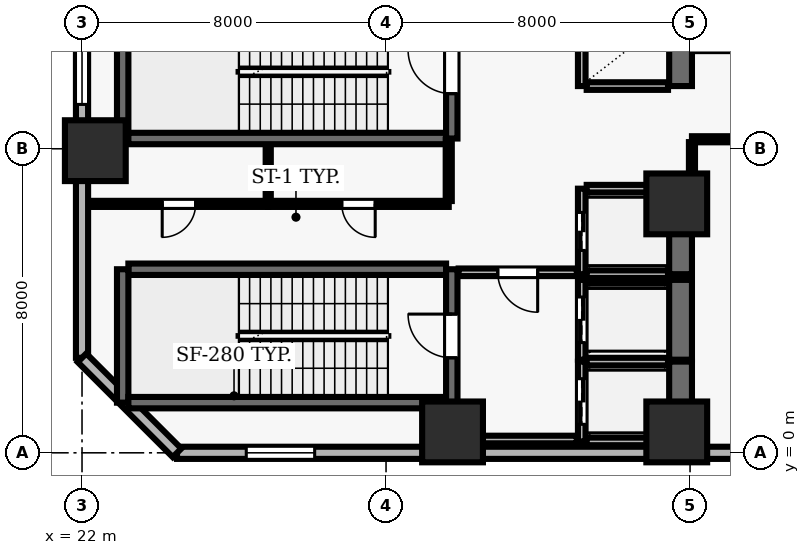
"""IFC4 building model, lengths in metres.
Left out: names, types, materials, properties, quantities, classifications, styles, units other than length and angle.
Written with IfcOpenShell. Run it as: python <this file> out.ifc"""

import sys

from ifc_helpers import new_model, si_unit, direction, frame, frame_2d, origin, origin_2d, place, context, subcontext, project, spatial, rectangle, extrude, element, fill, save


model = new_model("IFC4")
c1 = context("Model", 3, precision=1e-05, world=origin(), true_north=direction((0.0, 1.0)))
c2 = subcontext(c1, "Body", "Model", "MODEL_VIEW")
j1 = project(units=[si_unit("LENGTHUNIT", "METRE"), si_unit("PLANEANGLEUNIT", "RADIAN")], contexts=[c1])
p1 = place(None, origin())
s1 = spatial("IfcSite", under=j1, at=p1, CompositionType="ELEMENT")
p2 = place(p1, origin())
s2 = spatial("IfcBuilding", under=s1, at=p2, CompositionType="ELEMENT")
p3 = place(p2, frame((0.0, 0.0, 10.4)))
s3 = spatial("IfcBuildingStorey", under=s2, at=p3, CompositionType="ELEMENT", Elevation=10.4)
for number, where, z_axis, x_axis in (
    (1, (31.75, 0.55, 0.0), (0.0, 0.0, 1.0), (1.0, 0.0, 0.0)),
    (2, (37.65, 0.55, 0.0), (0.0, 0.0, 1.0), (1.0, 0.0, 0.0)),
    (3, (22.35, 7.95, 0.0), (0.0, 0.0, 1.0), (1.0, 0.0, 0.0)),
    (4, (37.65, 6.55, 0.0), (0.0, 0.0, 1.0), (1.0, 0.0, 0.0)),
):
    element("IfcColumn", number, at=place(p3, frame(where, z_axis=z_axis, x_axis=x_axis)), inside=s3, PredefinedType="COLUMN", context=c2, shape_type="SweptSolid", body=[
        extrude(rectangle(XDim=1.6, YDim=1.6, at=origin_2d()), origin(), (0.0, 0.0, 1.0), 5.2),
    ])
p4 = place(p3, frame((24.5, 0.0, 0.0), z_axis=(0.0, 0.0, 1.0), x_axis=(1.0, 0.0, 0.0)))
e5 = element("IfcWall", 5, at=p4, inside=s3, PredefinedType="SOLIDWALL", context=c2, shape_type="SweptSolid", body=[
    extrude(rectangle(XDim=49.0, YDim=0.32, at=frame_2d((24.5, 0.0))), origin(), (0.0, 0.0, 1.0), 4.92),
])
p5 = place(p4, frame((1.822, 0.0, 0.9)))
e6 = element("IfcOpeningElement", 6, at=p5, cuts=e5, PredefinedType="OPENING", context=c2, shape_type="SweptSolid", body=[
    extrude(rectangle(XDim=1.8, YDim=1.6, at=frame_2d((0.9, 0.8))), frame((0.0, 0.17, 0.0), z_axis=(0.0, -1.0, 0.0), x_axis=(1.0, 0.0, 0.0)), (0.0, 0.0, 1.0), 0.34),
])
p6 = place(p4, frame((18.156, 0.0, 0.9)))
e7 = element("IfcOpeningElement", 7, at=p6, cuts=e5, PredefinedType="OPENING", context=c2, shape_type="SweptSolid", body=[
    extrude(rectangle(XDim=1.8, YDim=1.6, at=frame_2d((0.9, 0.8))), frame((0.0, 0.17, 0.0), z_axis=(0.0, -1.0, 0.0), x_axis=(1.0, 0.0, 0.0)), (0.0, 0.0, 1.0), 0.34),
])
p7 = place(p4, frame((23.6, 0.0, 0.9)))
e8 = element("IfcOpeningElement", 8, at=p7, cuts=e5, PredefinedType="OPENING", context=c2, shape_type="SweptSolid", body=[
    extrude(rectangle(XDim=1.8, YDim=1.6, at=frame_2d((0.9, 0.8))), frame((0.0, 0.17, 0.0), z_axis=(0.0, -1.0, 0.0), x_axis=(1.0, 0.0, 0.0)), (0.0, 0.0, 1.0), 0.34),
])
p8 = place(p4, frame((29.044, 0.0, 0.9)))
e9 = element("IfcOpeningElement", 9, at=p8, cuts=e5, PredefinedType="OPENING", context=c2, shape_type="SweptSolid", body=[
    extrude(rectangle(XDim=1.8, YDim=1.6, at=frame_2d((0.9, 0.8))), frame((0.0, 0.17, 0.0), z_axis=(0.0, -1.0, 0.0), x_axis=(1.0, 0.0, 0.0)), (0.0, 0.0, 1.0), 0.34),
])
p9 = place(p4, frame((34.489, 0.0, 0.9)))
e10 = element("IfcOpeningElement", 10, at=p9, cuts=e5, PredefinedType="OPENING", context=c2, shape_type="SweptSolid", body=[
    extrude(rectangle(XDim=1.8, YDim=1.6, at=frame_2d((0.9, 0.8))), frame((0.0, 0.17, 0.0), z_axis=(0.0, -1.0, 0.0), x_axis=(1.0, 0.0, 0.0)), (0.0, 0.0, 1.0), 0.34),
])
p10 = place(p4, frame((39.933, 0.0, 0.9)))
e11 = element("IfcOpeningElement", 11, at=p10, cuts=e5, PredefinedType="OPENING", context=c2, shape_type="SweptSolid", body=[
    extrude(rectangle(XDim=1.8, YDim=1.6, at=frame_2d((0.9, 0.8))), frame((0.0, 0.17, 0.0), z_axis=(0.0, -1.0, 0.0), x_axis=(1.0, 0.0, 0.0)), (0.0, 0.0, 1.0), 0.34),
])
p11 = place(p4, frame((45.378, 0.0, 0.9)))
e12 = element("IfcOpeningElement", 12, at=p11, cuts=e5, PredefinedType="OPENING", context=c2, shape_type="SweptSolid", body=[
    extrude(rectangle(XDim=1.8, YDim=1.6, at=frame_2d((0.9, 0.8))), frame((0.0, 0.17, 0.0), z_axis=(0.0, -1.0, 0.0), x_axis=(1.0, 0.0, 0.0)), (0.0, 0.0, 1.0), 0.34),
])
p12 = place(p3, frame((22.0, 51.5, 0.0), z_axis=(0.0, 0.0, 1.0), x_axis=(0.0, -1.0, 0.0)))
e13 = element("IfcWall", 13, at=p12, inside=s3, PredefinedType="SOLIDWALL", context=c2, shape_type="SweptSolid", body=[
    extrude(rectangle(XDim=49.0, YDim=0.32, at=frame_2d((24.5, 0.0))), origin(), (0.0, 0.0, 1.0), 4.92),
])
p13 = place(p12, frame((0.772, 0.0, 0.9)))
e14 = element("IfcOpeningElement", 14, at=p13, cuts=e13, PredefinedType="OPENING", context=c2, shape_type="SweptSolid", body=[
    extrude(rectangle(XDim=3.0, YDim=2.2, at=frame_2d((1.5, 1.1))), frame((0.0, 0.17, 0.0), z_axis=(0.0, -1.0, 0.0), x_axis=(1.0, 0.0, 0.0)), (0.0, 0.0, 1.0), 0.34),
])
p14 = place(p12, frame((6.667, 0.0, 0.9)))
e15 = element("IfcOpeningElement", 15, at=p14, cuts=e13, PredefinedType="OPENING", context=c2, shape_type="SweptSolid", body=[
    extrude(rectangle(XDim=3.0, YDim=2.2, at=frame_2d((1.5, 1.1))), frame((0.0, 0.17, 0.0), z_axis=(0.0, -1.0, 0.0), x_axis=(1.0, 0.0, 0.0)), (0.0, 0.0, 1.0), 0.34),
])
p15 = place(p12, frame((11.661, 0.0, 0.9)))
e16 = element("IfcOpeningElement", 16, at=p15, cuts=e13, PredefinedType="OPENING", context=c2, shape_type="SweptSolid", body=[
    extrude(rectangle(XDim=3.0, YDim=2.2, at=frame_2d((1.5, 1.1))), frame((0.0, 0.17, 0.0), z_axis=(0.0, -1.0, 0.0), x_axis=(1.0, 0.0, 0.0)), (0.0, 0.0, 1.0), 0.34),
])
p16 = place(p12, frame((17.556, 0.0, 0.9)))
e17 = element("IfcOpeningElement", 17, at=p16, cuts=e13, PredefinedType="OPENING", context=c2, shape_type="SweptSolid", body=[
    extrude(rectangle(XDim=3.0, YDim=2.2, at=frame_2d((1.5, 1.1))), frame((0.0, 0.17, 0.0), z_axis=(0.0, -1.0, 0.0), x_axis=(1.0, 0.0, 0.0)), (0.0, 0.0, 1.0), 0.34),
])
p17 = place(p12, frame((39.333, 0.0, 0.9)))
e18 = element("IfcOpeningElement", 18, at=p17, cuts=e13, PredefinedType="OPENING", context=c2, shape_type="SweptSolid", body=[
    extrude(rectangle(XDim=3.0, YDim=2.2, at=frame_2d((1.5, 1.1))), frame((0.0, 0.17, 0.0), z_axis=(0.0, -1.0, 0.0), x_axis=(1.0, 0.0, 0.0)), (0.0, 0.0, 1.0), 0.34),
])
p18 = place(p3, frame((22.0, 2.5, 0.0), z_axis=(0.0, 0.0, 1.0), x_axis=(0.707106781187, -0.707106781187, 0.0)))
e19 = element("IfcWall", 19, at=p18, inside=s3, PredefinedType="SOLIDWALL", context=c2, shape_type="SweptSolid", body=[
    extrude(rectangle(XDim=3.536, YDim=0.32, at=frame_2d((1.768, 0.0))), origin(), (0.0, 0.0, 1.0), 4.92),
])
p19 = place(p3, frame((31.58, 4.83, 0.0), z_axis=(0.0, 0.0, 1.0), x_axis=(-1.0, 0.0, 0.0)))
e20 = element("IfcWall", 20, at=p19, inside=s3, PredefinedType="SHEAR", context=c2, shape_type="SweptSolid", body=[
    extrude(rectangle(XDim=8.36, YDim=0.3, at=frame_2d((4.18, 0.0))), origin(), (0.0, 0.0, 1.0), 4.92),
])
p20 = place(p3, frame((23.07, 4.83, 0.0), z_axis=(0.0, 0.0, 1.0), x_axis=(0.0, -1.0, 0.0)))
e21 = element("IfcWall", 21, at=p20, inside=s3, PredefinedType="SHEAR", context=c2, shape_type="SweptSolid", body=[
    extrude(rectangle(XDim=3.51, YDim=0.3, at=frame_2d((1.755, 0.0))), origin(), (0.0, 0.0, 1.0), 4.92),
])
p21 = place(p3, frame((23.22, 1.32, 0.0), z_axis=(0.0, 0.0, 1.0), x_axis=(1.0, 0.0, 0.0)))
e22 = element("IfcWall", 22, at=p21, inside=s3, PredefinedType="SHEAR", context=c2, shape_type="SweptSolid", body=[
    extrude(rectangle(XDim=8.36, YDim=0.3, at=frame_2d((4.18, 0.0))), origin(), (0.0, 0.0, 1.0), 4.92),
])
p22 = place(p3, frame((31.73, 0.96, 0.0), z_axis=(0.0, 0.0, 1.0), x_axis=(0.0, 1.0, 0.0)))
e23 = element("IfcWall", 23, at=p22, inside=s3, PredefinedType="SHEAR", context=c2, shape_type="SweptSolid", body=[
    extrude(rectangle(XDim=3.87, YDim=0.3, at=frame_2d((1.935, 0.0))), origin(), (0.0, 0.0, 1.0), 4.92),
])
p23 = place(p22, frame((1.54, 0.0, 0.0)))
e24 = element("IfcOpeningElement", 24, at=p23, cuts=e23, PredefinedType="OPENING", context=c2, shape_type="SweptSolid", body=[
    extrude(rectangle(XDim=1.15, YDim=2.15, at=frame_2d((0.575, 1.075))), frame((0.0, 0.16, 0.0), z_axis=(0.0, -1.0, 0.0), x_axis=(1.0, 0.0, 0.0)), (0.0, 0.0, 1.0), 0.32),
])
p24 = place(p3, frame((23.07, 11.78, 0.0), z_axis=(0.0, 0.0, 1.0), x_axis=(0.0, -1.0, 0.0)))
e25 = element("IfcWall", 25, at=p24, inside=s3, PredefinedType="SHEAR", context=c2, shape_type="SweptSolid", body=[
    extrude(rectangle(XDim=3.51, YDim=0.3, at=frame_2d((1.755, 0.0))), origin(), (0.0, 0.0, 1.0), 4.92),
])
p25 = place(p3, frame((23.22, 8.27, 0.0), z_axis=(0.0, 0.0, 1.0), x_axis=(1.0, 0.0, 0.0)))
e26 = element("IfcWall", 26, at=p25, inside=s3, PredefinedType="SHEAR", context=c2, shape_type="SweptSolid", body=[
    extrude(rectangle(XDim=8.36, YDim=0.3, at=frame_2d((4.18, 0.0))), origin(), (0.0, 0.0, 1.0), 4.92),
])
p26 = place(p3, frame((31.73, 8.27, 0.0), z_axis=(0.0, 0.0, 1.0), x_axis=(0.0, 1.0, 0.0)))
e27 = element("IfcWall", 27, at=p26, inside=s3, PredefinedType="SHEAR", context=c2, shape_type="SweptSolid", body=[
    extrude(rectangle(XDim=3.51, YDim=0.3, at=frame_2d((1.755, 0.0))), origin(), (0.0, 0.0, 1.0), 4.92),
])
p27 = place(p26, frame((1.18, 0.0, 0.0)))
e28 = element("IfcOpeningElement", 28, at=p27, cuts=e27, PredefinedType="OPENING", context=c2, shape_type="SweptSolid", body=[
    extrude(rectangle(XDim=1.15, YDim=2.15, at=frame_2d((0.575, 1.075))), frame((0.0, 0.16, 0.0), z_axis=(0.0, -1.0, 0.0), x_axis=(1.0, 0.0, 0.0)), (0.0, 0.0, 1.0), 0.32),
])
p28 = place(p3, frame((35.15, 2.4, 0.0), z_axis=(0.0, 0.0, 1.0), x_axis=(0.0, -1.0, 0.0)))
e29 = element("IfcWall", 29, at=p28, inside=s3, PredefinedType="SOLIDWALL", context=c2, shape_type="SweptSolid", body=[
    extrude(rectangle(XDim=2.1, YDim=0.2, at=frame_2d((1.05, 0.0))), origin(), (0.0, 0.0, 1.0), 4.92),
])
p29 = place(p28, frame((0.45, 0.0, 0.0)))
e30 = element("IfcOpeningElement", 30, at=p29, cuts=e29, PredefinedType="OPENING", context=c2, shape_type="SweptSolid", body=[
    extrude(rectangle(XDim=1.2, YDim=2.15, at=frame_2d((0.6, 1.075))), frame((0.0, 0.11, 0.0), z_axis=(0.0, -1.0, 0.0), x_axis=(1.0, 0.0, 0.0)), (0.0, 0.0, 1.0), 0.22),
])
p30 = place(p3, frame((37.75, 0.3, 0.0), z_axis=(0.0, 0.0, 1.0), x_axis=(0.0, 1.0, 0.0)))
e31 = element("IfcWall", 31, at=p30, inside=s3, PredefinedType="SHEAR", context=c2, shape_type="SweptSolid", body=[
    extrude(rectangle(XDim=2.1, YDim=0.6, at=frame_2d((1.05, 0.0))), origin(), (0.0, 0.0, 1.0), 4.92),
])
for number, where, z_axis, x_axis in (
    (32, (35.28, 0.3, 0.0), (0.0, 0.0, 1.0), (1.0, 0.0, 0.0)),
    (33, (37.42, 2.4, 0.0), (0.0, 0.0, 1.0), (-1.0, 0.0, 0.0)),
):
    element("IfcWall", number, at=place(p3, frame(where, z_axis=z_axis, x_axis=x_axis)), inside=s3, PredefinedType="SOLIDWALL", context=c2, shape_type="SweptSolid", body=[
        extrude(rectangle(XDim=2.14, YDim=0.2, at=frame_2d((1.07, 0.0))), origin(), (0.0, 0.0, 1.0), 4.92),
    ])
p31 = place(p3, frame((35.15, 4.55, 0.0), z_axis=(0.0, 0.0, 1.0), x_axis=(0.0, -1.0, 0.0)))
e34 = element("IfcWall", 34, at=p31, inside=s3, PredefinedType="SOLIDWALL", context=c2, shape_type="SweptSolid", body=[
    extrude(rectangle(XDim=2.1, YDim=0.2, at=frame_2d((1.05, 0.0))), origin(), (0.0, 0.0, 1.0), 4.92),
])
p32 = place(p31, frame((0.45, 0.0, 0.0)))
e35 = element("IfcOpeningElement", 35, at=p32, cuts=e34, PredefinedType="OPENING", context=c2, shape_type="SweptSolid", body=[
    extrude(rectangle(XDim=1.2, YDim=2.15, at=frame_2d((0.6, 1.075))), frame((0.0, 0.11, 0.0), z_axis=(0.0, -1.0, 0.0), x_axis=(1.0, 0.0, 0.0)), (0.0, 0.0, 1.0), 0.22),
])
p33 = place(p3, frame((37.75, 2.45, 0.0), z_axis=(0.0, 0.0, 1.0), x_axis=(0.0, 1.0, 0.0)))
e36 = element("IfcWall", 36, at=p33, inside=s3, PredefinedType="SHEAR", context=c2, shape_type="SweptSolid", body=[
    extrude(rectangle(XDim=2.1, YDim=0.6, at=frame_2d((1.05, 0.0))), origin(), (0.0, 0.0, 1.0), 4.92),
])
p34 = place(p3, frame((37.42, 4.55, 0.0), z_axis=(0.0, 0.0, 1.0), x_axis=(-1.0, 0.0, 0.0)))
e37 = element("IfcWall", 37, at=p34, inside=s3, PredefinedType="SOLIDWALL", context=c2, shape_type="SweptSolid", body=[
    extrude(rectangle(XDim=2.14, YDim=0.2, at=frame_2d((1.07, 0.0))), origin(), (0.0, 0.0, 1.0), 4.92),
])
p35 = place(p3, frame((35.15, 6.95, 0.0), z_axis=(0.0, 0.0, 1.0), x_axis=(0.0, -1.0, 0.0)))
e38 = element("IfcWall", 38, at=p35, inside=s3, PredefinedType="SOLIDWALL", context=c2, shape_type="SweptSolid", body=[
    extrude(rectangle(XDim=2.25, YDim=0.2, at=frame_2d((1.125, 0.0))), origin(), (0.0, 0.0, 1.0), 4.92),
])
p36 = place(p35, frame((0.625, 0.0, 0.0)))
e39 = element("IfcOpeningElement", 39, at=p36, cuts=e38, PredefinedType="OPENING", context=c2, shape_type="SweptSolid", body=[
    extrude(rectangle(XDim=1.0, YDim=2.1, at=frame_2d((0.5, 1.05))), frame((0.0, 0.11, 0.0), z_axis=(0.0, -1.0, 0.0), x_axis=(1.0, 0.0, 0.0)), (0.0, 0.0, 1.0), 0.22),
])
p37 = place(p3, frame((37.75, 4.7, 0.0), z_axis=(0.0, 0.0, 1.0), x_axis=(0.0, 1.0, 0.0)))
e40 = element("IfcWall", 40, at=p37, inside=s3, PredefinedType="SHEAR", context=c2, shape_type="SweptSolid", body=[
    extrude(rectangle(XDim=2.25, YDim=0.6, at=frame_2d((1.125, 0.0))), origin(), (0.0, 0.0, 1.0), 4.92),
])
for number, where, z_axis, x_axis in (
    (41, (35.28, 4.7, 0.0), (0.0, 0.0, 1.0), (1.0, 0.0, 0.0)),
    (42, (37.42, 6.95, 0.0), (0.0, 0.0, 1.0), (-1.0, 0.0, 0.0)),
):
    element("IfcWall", number, at=place(p3, frame(where, z_axis=z_axis, x_axis=x_axis)), inside=s3, PredefinedType="SOLIDWALL", context=c2, shape_type="SweptSolid", body=[
        extrude(rectangle(XDim=2.14, YDim=0.2, at=frame_2d((1.07, 0.0))), origin(), (0.0, 0.0, 1.0), 4.92),
    ])
p38 = place(p3, frame((35.15, 11.55, 0.0), z_axis=(0.0, 0.0, 1.0), x_axis=(0.0, -1.0, 0.0)))
e43 = element("IfcWall", 43, at=p38, inside=s3, PredefinedType="SOLIDWALL", context=c2, shape_type="SweptSolid", body=[
    extrude(rectangle(XDim=1.9, YDim=0.2, at=frame_2d((0.95, 0.0))), origin(), (0.0, 0.0, 1.0), 4.92),
])
p39 = place(p3, frame((37.75, 9.65, 0.0), z_axis=(0.0, 0.0, 1.0), x_axis=(0.0, 1.0, 0.0)))
e44 = element("IfcWall", 44, at=p39, inside=s3, PredefinedType="SHEAR", context=c2, shape_type="SweptSolid", body=[
    extrude(rectangle(XDim=1.9, YDim=0.6, at=frame_2d((0.95, 0.0))), origin(), (0.0, 0.0, 1.0), 4.92),
])
p40 = place(p3, frame((35.28, 9.65, 0.0), z_axis=(0.0, 0.0, 1.0), x_axis=(1.0, 0.0, 0.0)))
e45 = element("IfcWall", 45, at=p40, inside=s3, PredefinedType="SOLIDWALL", context=c2, shape_type="SweptSolid", body=[
    extrude(rectangle(XDim=2.14, YDim=0.2, at=frame_2d((1.07, 0.0))), origin(), (0.0, 0.0, 1.0), 4.92),
])
p41 = place(p3, frame((26.9, 6.55, 0.0), z_axis=(0.0, 0.0, 1.0), x_axis=(-1.0, 0.0, 0.0)))
e46 = element("IfcWall", 46, at=p41, inside=s3, PredefinedType="PARTITIONING", context=c2, shape_type="SweptSolid", body=[
    extrude(rectangle(XDim=4.7, YDim=0.16, at=frame_2d((2.35, 0.0))), origin(), (0.0, 0.0, 1.0), 4.92),
])
p42 = place(p41, frame((1.91, 0.0, 0.0)))
e47 = element("IfcOpeningElement", 47, at=p42, cuts=e46, PredefinedType="OPENING", context=c2, shape_type="SweptSolid", body=[
    extrude(rectangle(XDim=0.88, YDim=2.1, at=frame_2d((0.44, 1.05))), frame((0.0, 0.09, 0.0), z_axis=(0.0, -1.0, 0.0), x_axis=(1.0, 0.0, 0.0)), (0.0, 0.0, 1.0), 0.18),
])
p43 = place(p3, frame((31.65, 0.35, 0.0), z_axis=(0.0, 0.0, 1.0), x_axis=(1.0, 0.0, 0.0)))
e48 = element("IfcWall", 48, at=p43, inside=s3, PredefinedType="SOLIDWALL", context=c2, shape_type="SweptSolid", body=[
    extrude(rectangle(XDim=3.37, YDim=0.2, at=frame_2d((1.685, 0.0))), origin(), (0.0, 0.0, 1.0), 4.92),
])
p44 = place(p3, frame((31.65, 6.55, 0.0), z_axis=(0.0, 0.0, 1.0), x_axis=(-1.0, 0.0, 0.0)))
e49 = element("IfcWall", 49, at=p44, inside=s3, PredefinedType="PARTITIONING", context=c2, shape_type="SweptSolid", body=[
    extrude(rectangle(XDim=4.75, YDim=0.16, at=frame_2d((2.375, 0.0))), origin(), (0.0, 0.0, 1.0), 4.92),
])
p45 = place(p44, frame((1.935, 0.0, 0.0)))
e50 = element("IfcOpeningElement", 50, at=p45, cuts=e49, PredefinedType="OPENING", context=c2, shape_type="SweptSolid", body=[
    extrude(rectangle(XDim=0.88, YDim=2.1, at=frame_2d((0.44, 1.05))), frame((0.0, 0.09, 0.0), z_axis=(0.0, -1.0, 0.0), x_axis=(1.0, 0.0, 0.0)), (0.0, 0.0, 1.0), 0.18),
])
p46 = place(p3, frame((35.02, 4.75, 0.0), z_axis=(0.0, 0.0, 1.0), x_axis=(-1.0, 0.0, 0.0)))
e51 = element("IfcWall", 51, at=p46, inside=s3, PredefinedType="SOLIDWALL", context=c2, shape_type="SweptSolid", body=[
    extrude(rectangle(XDim=3.11, YDim=0.2, at=frame_2d((1.555, 0.0))), origin(), (0.0, 0.0, 1.0), 4.92),
])
p47 = place(p46, frame((1.03, 0.0, 0.0)))
e52 = element("IfcOpeningElement", 52, at=p47, cuts=e51, PredefinedType="OPENING", context=c2, shape_type="SweptSolid", body=[
    extrude(rectangle(XDim=1.05, YDim=2.15, at=frame_2d((0.525, 1.075))), frame((0.0, 0.11, 0.0), z_axis=(0.0, -1.0, 0.0), x_axis=(1.0, 0.0, 0.0)), (0.0, 0.0, 1.0), 0.22),
])
p48 = place(p3, frame((38.05, 8.25, 0.0), z_axis=(0.0, 0.0, 1.0), x_axis=(1.0, 0.0, 0.0)))
e53 = element("IfcWall", 53, at=p48, inside=s3, PredefinedType="PARTITIONING", context=c2, shape_type="SweptSolid", body=[
    extrude(rectangle(XDim=19.75, YDim=0.16, at=frame_2d((9.875, 0.0))), origin(), (0.0, 0.0, 1.0), 4.065),
])
p49 = place(p48, frame((10.075, 0.0, 0.0)))
e54 = element("IfcOpeningElement", 54, at=p49, cuts=e53, PredefinedType="OPENING", context=c2, shape_type="SweptSolid", body=[
    extrude(rectangle(XDim=1.0, YDim=2.1, at=frame_2d((0.5, 1.05))), frame((0.0, 0.09, 0.0), z_axis=(0.0, -1.0, 0.0), x_axis=(1.0, 0.0, 0.0)), (0.0, 0.0, 1.0), 0.18),
])
p50 = place(p3, frame((26.9, 6.625, 0.0), z_axis=(0.0, 0.0, 1.0), x_axis=(0.0, 1.0, 0.0)))
e55 = element("IfcWall", 55, at=p50, inside=s3, PredefinedType="PARTITIONING", context=c2, shape_type="SweptSolid", body=[
    extrude(rectangle(XDim=1.465, YDim=0.135, at=frame_2d((0.732, 0.0))), origin(), (0.0, 0.0, 1.0), 4.92),
])
p51 = place(p3, frame((31.65, 8.24, 0.0), z_axis=(0.0, 0.0, 1.0), x_axis=(0.0, -1.0, 0.0)))
e56 = element("IfcWall", 56, at=p51, inside=s3, PredefinedType="PARTITIONING", context=c2, shape_type="SweptSolid", body=[
    extrude(rectangle(XDim=1.615, YDim=0.16, at=frame_2d((0.808, 0.0))), origin(), (0.0, 0.0, 1.0), 4.92),
])
p52 = place(p3, frame((38.05, 7.05, 0.0), z_axis=(0.0, 0.0, 1.0), x_axis=(0.0, 1.0, 0.0)))
e57 = element("IfcWall", 57, at=p52, inside=s3, PredefinedType="PARTITIONING", context=c2, shape_type="SweptSolid", body=[
    extrude(rectangle(XDim=1.125, YDim=0.16, at=frame_2d((0.562, 0.0))), origin(), (0.0, 0.0, 1.0), 4.065),
])
p53 = place(p5, origin())
e58 = element("IfcWindow", 58, at=p53, inside=s3, PartitioningType="SINGLE_PANEL", PredefinedType="WINDOW", context=c2, shape_type="SweptSolid", body=[
    extrude(rectangle(XDim=1.8, YDim=1.6, at=frame_2d((0.9, 0.8))), frame((0.0, 0.03, 0.0), z_axis=(0.0, -1.0, 0.0), x_axis=(1.0, 0.0, 0.0)), (0.0, 0.0, 1.0), 0.06),
])
fill(e6, e58)
p54 = place(p17, origin())
e59 = element("IfcWindow", 59, at=p54, inside=s3, PartitioningType="SINGLE_PANEL", PredefinedType="WINDOW", context=c2, shape_type="SweptSolid", body=[
    extrude(rectangle(XDim=3.0, YDim=2.2, at=frame_2d((1.5, 1.1))), frame((0.0, 0.03, 0.0), z_axis=(0.0, -1.0, 0.0), x_axis=(1.0, 0.0, 0.0)), (0.0, 0.0, 1.0), 0.06),
])
fill(e18, e59)
p55 = place(p23, origin())
e60 = element("IfcDoor", 60, at=p55, inside=s3, OperationType="SINGLE_SWING_RIGHT", PredefinedType="DOOR", context=c2, shape_type="SweptSolid", body=[
    extrude(rectangle(XDim=1.15, YDim=2.15, at=frame_2d((0.575, 1.075))), frame((0.0, 0.025, 0.0), z_axis=(0.0, -1.0, 0.0), x_axis=(1.0, 0.0, 0.0)), (0.0, 0.0, 1.0), 0.05),
])
fill(e24, e60)
p56 = place(p27, origin())
e61 = element("IfcDoor", 61, at=p56, inside=s3, OperationType="SINGLE_SWING_RIGHT", PredefinedType="DOOR", context=c2, shape_type="SweptSolid", body=[
    extrude(rectangle(XDim=1.15, YDim=2.15, at=frame_2d((0.575, 1.075))), frame((0.0, 0.025, 0.0), z_axis=(0.0, -1.0, 0.0), x_axis=(1.0, 0.0, 0.0)), (0.0, 0.0, 1.0), 0.05),
])
fill(e28, e61)
p57 = place(p29, origin())
e62 = element("IfcDoor", 62, at=p57, inside=s3, OperationType="DOUBLE_DOOR_SLIDING", PredefinedType="DOOR", context=c2, shape_type="SweptSolid", body=[
    extrude(rectangle(XDim=1.2, YDim=2.15, at=frame_2d((0.6, 1.075))), frame((0.0, 0.025, 0.0), z_axis=(0.0, -1.0, 0.0), x_axis=(1.0, 0.0, 0.0)), (0.0, 0.0, 1.0), 0.05),
])
fill(e30, e62)
p58 = place(p32, origin())
e63 = element("IfcDoor", 63, at=p58, inside=s3, OperationType="DOUBLE_DOOR_SLIDING", PredefinedType="DOOR", context=c2, shape_type="SweptSolid", body=[
    extrude(rectangle(XDim=1.2, YDim=2.15, at=frame_2d((0.6, 1.075))), frame((0.0, 0.025, 0.0), z_axis=(0.0, -1.0, 0.0), x_axis=(1.0, 0.0, 0.0)), (0.0, 0.0, 1.0), 0.05),
])
fill(e35, e63)
p59 = place(p36, origin())
e64 = element("IfcDoor", 64, at=p59, inside=s3, OperationType="DOUBLE_DOOR_SLIDING", PredefinedType="DOOR", context=c2, shape_type="SweptSolid", body=[
    extrude(rectangle(XDim=1.0, YDim=2.1, at=frame_2d((0.5, 1.05))), frame((0.0, 0.025, 0.0), z_axis=(0.0, -1.0, 0.0), x_axis=(1.0, 0.0, 0.0)), (0.0, 0.0, 1.0), 0.05),
])
fill(e39, e64)
p60 = place(p47, origin())
e65 = element("IfcDoor", 65, at=p60, inside=s3, OperationType="SINGLE_SWING_LEFT", PredefinedType="DOOR", context=c2, shape_type="SweptSolid", body=[
    extrude(rectangle(XDim=1.05, YDim=2.15, at=frame_2d((0.525, 1.075))), frame((0.0, 0.025, 0.0), z_axis=(0.0, -1.0, 0.0), x_axis=(1.0, 0.0, 0.0)), (0.0, 0.0, 1.0), 0.05),
])
fill(e52, e65)
p61 = place(p42, origin())
e66 = element("IfcDoor", 66, at=p61, inside=s3, OperationType="SINGLE_SWING_RIGHT", PredefinedType="DOOR", context=c2, shape_type="SweptSolid", body=[
    extrude(rectangle(XDim=0.88, YDim=2.1, at=frame_2d((0.44, 1.05))), frame((0.0, 0.025, 0.0), z_axis=(0.0, -1.0, 0.0), x_axis=(1.0, 0.0, 0.0)), (0.0, 0.0, 1.0), 0.05),
])
fill(e47, e66)
p62 = place(p45, origin())
e67 = element("IfcDoor", 67, at=p62, inside=s3, OperationType="SINGLE_SWING_LEFT", PredefinedType="DOOR", context=c2, shape_type="SweptSolid", body=[
    extrude(rectangle(XDim=0.88, YDim=2.1, at=frame_2d((0.44, 1.05))), frame((0.0, 0.025, 0.0), z_axis=(0.0, -1.0, 0.0), x_axis=(1.0, 0.0, 0.0)), (0.0, 0.0, 1.0), 0.05),
])
fill(e50, e67)
save(model, sys.argv[1])
